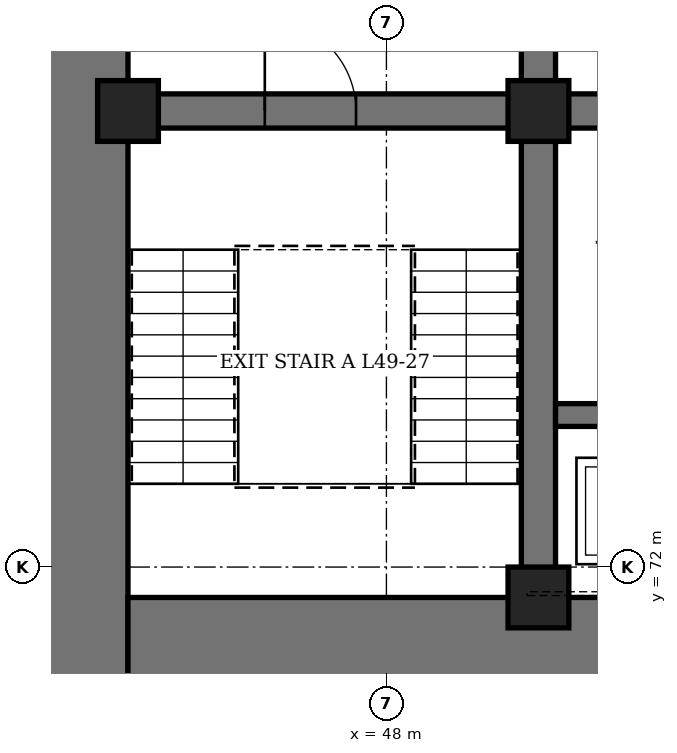
"""IFC4 building model, lengths in metres.
Left out: names, types, materials, properties, quantities, classifications, styles, units other than length and angle.
Written with IfcOpenShell. Run it as: python <this file> out.ifc"""

import sys

from ifc_helpers import new_model, si_unit, direction, frame, frame_2d, origin, origin_2d, place, context, subcontext, project, spatial, rectangle, hollow_rectangle, extrude, element, fill, save


model = new_model("IFC4")
c1 = context("Model", 3, precision=1e-05, world=origin(), true_north=direction((0.0, 1.0)))
c2 = subcontext(c1, "Body", "Model", "MODEL_VIEW")
j1 = project(units=[si_unit("LENGTHUNIT", "METRE"), si_unit("PLANEANGLEUNIT", "RADIAN")], contexts=[c1])
p1 = place(None, origin())
s1 = spatial("IfcSite", under=j1, at=p1, CompositionType="ELEMENT")
p2 = place(p1, origin())
s2 = spatial("IfcBuilding", under=s1, at=p2, CompositionType="ELEMENT")
p3 = place(p2, frame((0.0, 0.0, 219.1)))
s3 = spatial("IfcBuildingStorey", under=s2, at=p3, CompositionType="ELEMENT", Elevation=219.1)
p4 = place(p3, frame((44.0, 70.4, 0.0), z_axis=(0.0, 0.0, 1.0), x_axis=(0.0, 1.0, 0.0)))
e1 = element("IfcWall", 1, at=p4, inside=s3, PredefinedType="SHEAR", context=c2, shape_type="SweptSolid", body=[
    extrude(rectangle(XDim=19.2, YDim=1.2, at=frame_2d((9.6, 0.0))), origin(), (0.0, 0.0, 1.0), 4.2),
])
p5 = place(p4, frame((8.6, 0.0, 0.0)))
e2 = element("IfcOpeningElement", 2, at=p5, cuts=e1, PredefinedType="OPENING", context=c2, shape_type="SweptSolid", body=[
    extrude(rectangle(XDim=2.0, YDim=2.4, at=frame_2d((1.0, 1.2))), frame((0.0, 0.61, 0.0), z_axis=(0.0, -1.0, 0.0), x_axis=(1.0, 0.0, 0.0)), (0.0, 0.0, 1.0), 1.22),
])
p6 = place(p3, frame((44.6, 71.0, 0.0), z_axis=(0.0, 0.0, 1.0), x_axis=(1.0, 0.0, 0.0)))
e3 = element("IfcWall", 3, at=p6, inside=s3, PredefinedType="SHEAR", context=c2, shape_type="SweptSolid", body=[
    extrude(rectangle(XDim=22.8, YDim=1.2, at=frame_2d((11.4, 0.0))), origin(), (0.0, 0.0, 1.0), 4.2),
])
p7 = place(p6, frame((6.35, 0.0, 0.0)))
e4 = element("IfcOpeningElement", 4, at=p7, cuts=e3, PredefinedType="OPENING", context=c2, shape_type="SweptSolid", body=[
    extrude(rectangle(XDim=1.1, YDim=2.2, at=frame_2d((0.55, 1.1))), frame((0.0, 0.61, 0.0), z_axis=(0.0, -1.0, 0.0), x_axis=(1.0, 0.0, 0.0)), (0.0, 0.0, 1.0), 1.22),
])
p8 = place(p6, frame((9.35, 0.0, 0.0)))
e5 = element("IfcOpeningElement", 5, at=p8, cuts=e3, PredefinedType="OPENING", context=c2, shape_type="SweptSolid", body=[
    extrude(rectangle(XDim=1.1, YDim=2.2, at=frame_2d((0.55, 1.1))), frame((0.0, 0.61, 0.0), z_axis=(0.0, -1.0, 0.0), x_axis=(1.0, 0.0, 0.0)), (0.0, 0.0, 1.0), 1.22),
])
p9 = place(p6, frame((12.35, 0.0, 0.0)))
e6 = element("IfcOpeningElement", 6, at=p9, cuts=e3, PredefinedType="OPENING", context=c2, shape_type="SweptSolid", body=[
    extrude(rectangle(XDim=1.1, YDim=2.2, at=frame_2d((0.55, 1.1))), frame((0.0, 0.61, 0.0), z_axis=(0.0, -1.0, 0.0), x_axis=(1.0, 0.0, 0.0)), (0.0, 0.0, 1.0), 1.22),
])
p10 = place(p6, frame((15.35, 0.0, 0.0)))
e7 = element("IfcOpeningElement", 7, at=p10, cuts=e3, PredefinedType="OPENING", context=c2, shape_type="SweptSolid", body=[
    extrude(rectangle(XDim=1.1, YDim=2.2, at=frame_2d((0.55, 1.1))), frame((0.0, 0.61, 0.0), z_axis=(0.0, -1.0, 0.0), x_axis=(1.0, 0.0, 0.0)), (0.0, 0.0, 1.0), 1.22),
])
p11 = place(p3, frame((50.0, 71.6, 0.0), z_axis=(0.0, 0.0, 1.0), x_axis=(0.0, 1.0, 0.0)))
e8 = element("IfcWall", 8, at=p11, inside=s3, PredefinedType="SHEAR", context=c2, shape_type="SweptSolid", body=[
    extrude(rectangle(XDim=16.8, YDim=0.45, at=frame_2d((8.4, 0.0))), origin(), (0.0, 0.0, 1.0), 4.2),
])
p12 = place(p11, frame((7.5, 0.0, 0.0)))
e9 = element("IfcOpeningElement", 9, at=p12, cuts=e8, PredefinedType="OPENING", context=c2, shape_type="SweptSolid", body=[
    extrude(rectangle(XDim=1.8, YDim=2.4, at=frame_2d((0.9, 1.2))), frame((0.0, 0.235, 0.0), z_axis=(0.0, -1.0, 0.0), x_axis=(1.0, 0.0, 0.0)), (0.0, 0.0, 1.0), 0.47),
])
p13 = place(p3, frame((44.6, 78.0, 0.0), z_axis=(0.0, 0.0, 1.0), x_axis=(1.0, 0.0, 0.0)))
e10 = element("IfcWall", 10, at=p13, inside=s3, PredefinedType="SHEAR", context=c2, shape_type="SweptSolid", body=[
    extrude(rectangle(XDim=5.175, YDim=0.45, at=frame_2d((2.587, 0.0))), origin(), (0.0, 0.0, 1.0), 4.2),
])
p14 = place(p13, frame((1.8, 0.0, 0.0)))
e11 = element("IfcOpeningElement", 11, at=p14, cuts=e10, PredefinedType="OPENING", context=c2, shape_type="SweptSolid", body=[
    extrude(rectangle(XDim=1.2, YDim=2.1, at=frame_2d((0.6, 1.05))), frame((0.0, 0.235, 0.0), z_axis=(0.0, -1.0, 0.0), x_axis=(1.0, 0.0, 0.0)), (0.0, 0.0, 1.0), 0.47),
])
p15 = place(p3, frame((50.225, 78.0, 0.0), z_axis=(0.0, 0.0, 1.0), x_axis=(1.0, 0.0, 0.0)))
e12 = element("IfcWall", 12, at=p15, inside=s3, PredefinedType="SHEAR", context=c2, shape_type="SweptSolid", body=[
    extrude(rectangle(XDim=11.55, YDim=0.45, at=frame_2d((5.775, 0.0))), origin(), (0.0, 0.0, 1.0), 4.2),
])
p16 = place(p15, frame((0.825, 0.0, 0.0)))
e13 = element("IfcOpeningElement", 13, at=p16, cuts=e12, PredefinedType="OPENING", context=c2, shape_type="SweptSolid", body=[
    extrude(rectangle(XDim=0.9, YDim=2.1, at=frame_2d((0.45, 1.05))), frame((0.0, 0.235, 0.0), z_axis=(0.0, -1.0, 0.0), x_axis=(1.0, 0.0, 0.0)), (0.0, 0.0, 1.0), 0.47),
])
p17 = place(p15, frame((3.825, 0.0, 0.0)))
e14 = element("IfcOpeningElement", 14, at=p17, cuts=e12, PredefinedType="OPENING", context=c2, shape_type="SweptSolid", body=[
    extrude(rectangle(XDim=0.9, YDim=2.1, at=frame_2d((0.45, 1.05))), frame((0.0, 0.235, 0.0), z_axis=(0.0, -1.0, 0.0), x_axis=(1.0, 0.0, 0.0)), (0.0, 0.0, 1.0), 0.47),
])
p18 = place(p15, frame((6.825, 0.0, 0.0)))
e15 = element("IfcOpeningElement", 15, at=p18, cuts=e12, PredefinedType="OPENING", context=c2, shape_type="SweptSolid", body=[
    extrude(rectangle(XDim=0.9, YDim=2.1, at=frame_2d((0.45, 1.05))), frame((0.0, 0.235, 0.0), z_axis=(0.0, -1.0, 0.0), x_axis=(1.0, 0.0, 0.0)), (0.0, 0.0, 1.0), 0.47),
])
p19 = place(p15, frame((9.825, 0.0, 0.0)))
e16 = element("IfcOpeningElement", 16, at=p19, cuts=e12, PredefinedType="OPENING", context=c2, shape_type="SweptSolid", body=[
    extrude(rectangle(XDim=0.9, YDim=2.1, at=frame_2d((0.45, 1.05))), frame((0.0, 0.235, 0.0), z_axis=(0.0, -1.0, 0.0), x_axis=(1.0, 0.0, 0.0)), (0.0, 0.0, 1.0), 0.47),
])
p20 = place(p3, frame((50.225, 74.0, 0.0), z_axis=(0.0, 0.0, 1.0), x_axis=(1.0, 0.0, 0.0)))
e17 = element("IfcWall", 17, at=p20, inside=s3, PredefinedType="SHEAR", context=c2, shape_type="SweptSolid", body=[
    extrude(rectangle(XDim=11.55, YDim=0.3, at=frame_2d((5.775, 0.0))), origin(), (0.0, 0.0, 1.0), 4.2),
])
for number, where, z_axis, x_axis in (
    (18, (44.6, 78.0, 0.0), (0.0, 0.0, 1.0), (1.0, 0.0, 0.0)),
    (19, (50.0, 71.6, 0.0), (0.0, 0.0, 1.0), (1.0, 0.0, 0.0)),
    (20, (50.0, 78.0, 0.0), (0.0, 0.0, 1.0), (1.0, 0.0, 0.0)),
):
    element("IfcColumn", number, at=place(p3, frame(where, z_axis=z_axis, x_axis=x_axis)), inside=s3, PredefinedType="COLUMN", context=c2, shape_type="SweptSolid", body=[
        extrude(hollow_rectangle(XDim=0.8, YDim=0.8, WallThickness=0.1, at=origin_2d()), origin(), (0.0, 0.0, 1.0), 4.2),
    ])
p21 = place(p14, origin())
e21 = element("IfcDoor", 21, at=p21, inside=s3, OperationType="SINGLE_SWING_LEFT", PredefinedType="DOOR", context=c2, shape_type="SweptSolid", body=[
    extrude(rectangle(XDim=1.2, YDim=2.1, at=frame_2d((0.6, 1.05))), frame((0.0, 0.225, 0.0), z_axis=(0.0, -1.0, 0.0), x_axis=(1.0, 0.0, 0.0)), (0.0, 0.0, 1.0), 0.449),
])
fill(e11, e21)
save(model, sys.argv[1])
